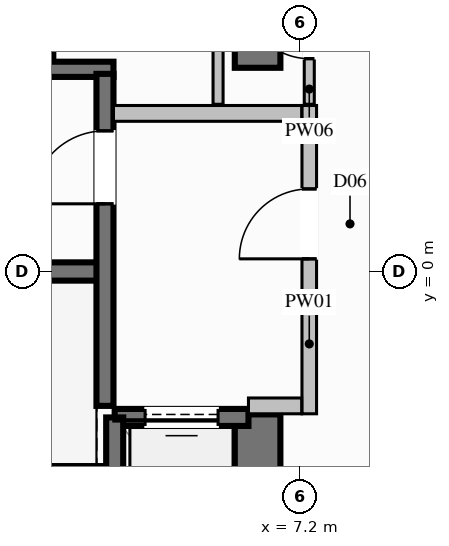
"""IFC4 building model, lengths in metres.
Left out: names, types, materials, properties, quantities, classifications, styles, units other than length and angle.
Written with IfcOpenShell. Run it as: python <this file> out.ifc"""

import sys

from ifc_helpers import new_model, si_unit, direction, frame, frame_2d, origin, place, context, subcontext, project, spatial, rectangle, extrude, element, fill, save


model = new_model("IFC4")
c1 = context("Model", 3, precision=1e-05, world=origin(), true_north=direction((0.0, 1.0)))
c2 = subcontext(c1, "Body", "Model", "MODEL_VIEW")
j1 = project(units=[si_unit("LENGTHUNIT", "METRE"), si_unit("PLANEANGLEUNIT", "RADIAN")], contexts=[c1])
p1 = place(None, origin())
s1 = spatial("IfcSite", under=j1, at=p1, CompositionType="ELEMENT")
p2 = place(p1, origin())
s2 = spatial("IfcBuilding", under=s1, at=p2, CompositionType="ELEMENT")
p3 = place(p2, frame((0.0, 0.0, 35.6)))
s3 = spatial("IfcBuildingStorey", under=s2, at=p3, CompositionType="ELEMENT", Elevation=35.6)
p4 = place(p3, frame((-3.99, 0.0, 0.0), z_axis=(0.0, 0.0, 1.0), x_axis=(1.0, 0.0, 0.0)))
e1 = element("IfcWall", 1, at=p4, inside=s3, PredefinedType="SHEAR", context=c2, shape_type="SweptSolid", body=[
    extrude(rectangle(XDim=7.98, YDim=0.3, at=frame_2d((3.99, 0.0))), origin(), (0.0, 0.0, 1.0), 3.6),
])
for number, where, z_axis, x_axis in (
    (2, (-4.13, -3.325, 0.0), (0.0, 0.0, 1.0), (1.0, 0.0, 0.0)),
    (3, (-4.13, 3.325, 0.0), (0.0, 0.0, 1.0), (1.0, 0.0, 0.0)),
):
    element("IfcWall", number, at=place(p3, frame(where, z_axis=z_axis, x_axis=x_axis)), inside=s3, PredefinedType="SOLIDWALL", context=c2, shape_type="SweptSolid", body=[
        extrude(rectangle(XDim=8.26, YDim=0.25, at=frame_2d((4.13, 0.0))), origin(), (0.0, 0.0, 1.0), 3.6),
    ])
p5 = place(p3, frame((6.5, -6.475, 0.0), z_axis=(0.0, 0.0, 1.0), x_axis=(0.0, 1.0, 0.0)))
e4 = element("IfcWall", 4, at=p5, inside=s3, PredefinedType="SHEAR", context=c2, shape_type="SweptSolid", body=[
    extrude(rectangle(XDim=4.125, YDim=0.75, at=frame_2d((2.062, 0.0))), origin(), (0.0, 0.0, 1.0), 3.6),
])
p6 = place(p3, frame((6.5, 3.35, 0.0), z_axis=(0.0, 0.0, 1.0), x_axis=(0.0, 1.0, 0.0)))
e5 = element("IfcWall", 5, at=p6, inside=s3, PredefinedType="SHEAR", context=c2, shape_type="SweptSolid", body=[
    extrude(rectangle(XDim=3.125, YDim=0.75, at=frame_2d((1.562, 0.0))), origin(), (0.0, 0.0, 1.0), 3.6),
])
p7 = place(p3, frame((3.0, 3.5, 0.0), z_axis=(0.0, 0.0, 1.0), x_axis=(0.0, 1.0, 0.0)))
e6 = element("IfcWall", 6, at=p7, inside=s3, PredefinedType="SOLIDWALL", context=c2, shape_type="SweptSolid", body=[
    extrude(rectangle(XDim=2.5, YDim=0.28, at=frame_2d((1.25, 0.0))), origin(), (0.0, 0.0, 1.0), 3.34),
])
p8 = place(p3, frame((6.35, -2.4, 0.0), z_axis=(0.0, 0.0, 1.0), x_axis=(-1.0, 0.0, 0.0)))
e7 = element("IfcWall", 7, at=p8, inside=s3, PredefinedType="SOLIDWALL", context=c2, shape_type="SweptSolid", body=[
    extrude(rectangle(XDim=2.2, YDim=0.28, at=frame_2d((1.1, 0.0))), origin(), (0.0, 0.0, 1.0), 3.34),
])
p9 = place(p8, frame((0.5, 0.0, 0.0)))
e8 = element("IfcOpeningElement", 8, at=p9, cuts=e7, PredefinedType="OPENING", context=c2, shape_type="SweptSolid", body=[
    extrude(rectangle(XDim=1.2, YDim=2.2, at=frame_2d((0.6, 1.1))), frame((0.0, 0.15, 0.0), z_axis=(0.0, -1.0, 0.0), x_axis=(1.0, 0.0, 0.0)), (0.0, 0.0, 1.0), 0.3),
])
p10 = place(p3, frame((4.15, -2.4, 0.0), z_axis=(0.0, 0.0, 1.0), x_axis=(0.0, -1.0, 0.0)))
e9 = element("IfcWall", 9, at=p10, inside=s3, PredefinedType="SOLIDWALL", context=c2, shape_type="SweptSolid", body=[
    extrude(rectangle(XDim=2.7, YDim=0.28, at=frame_2d((1.35, 0.0))), origin(), (0.0, 0.0, 1.0), 3.34),
])
p11 = place(p3, frame((3.99, -2.21, 0.0), z_axis=(0.0, 0.0, 1.0), x_axis=(0.0, 1.0, 0.0)))
e10 = element("IfcWall", 10, at=p11, inside=s3, PredefinedType="SOLIDWALL", context=c2, shape_type="SweptSolid", body=[
    extrude(rectangle(XDim=5.46, YDim=0.28, at=frame_2d((2.73, 0.0))), origin(), (0.0, 0.0, 1.0), 3.34),
])
p12 = place(p11, frame((3.323, 0.0, 0.0)))
e11 = element("IfcOpeningElement", 11, at=p12, cuts=e10, PredefinedType="OPENING", context=c2, shape_type="SweptSolid", body=[
    extrude(rectangle(XDim=1.2, YDim=2.2, at=frame_2d((0.6, 1.1))), frame((0.0, 0.15, 0.0), z_axis=(0.0, -1.0, 0.0), x_axis=(1.0, 0.0, 0.0)), (0.0, 0.0, 1.0), 0.3),
])
p13 = place(p3, frame((7.35, -2.34, 0.0), z_axis=(0.0, 0.0, 1.0), x_axis=(0.0, 1.0, 0.0)))
e12 = element("IfcWall", 12, at=p13, inside=s3, PredefinedType="PARTITIONING", context=c2, shape_type="SweptSolid", body=[
    extrude(rectangle(XDim=5.07, YDim=0.24, at=frame_2d((2.535, 0.0))), origin(), (0.0, 0.0, 1.0), 2.425),
])
p14 = place(p13, frame((2.548, 0.0, 0.0)))
e13 = element("IfcOpeningElement", 13, at=p14, cuts=e12, PredefinedType="OPENING", context=c2, shape_type="SweptSolid", body=[
    extrude(rectangle(XDim=1.15, YDim=2.2, at=frame_2d((0.575, 1.1))), frame((0.0, 0.13, 0.0), z_axis=(0.0, -1.0, 0.0), x_axis=(1.0, 0.0, 0.0)), (0.0, 0.0, 1.0), 0.26),
])
p15 = place(p3, frame((6.35, -2.21, 0.0), z_axis=(0.0, 0.0, 1.0), x_axis=(1.0, 0.0, 0.0)))
e14 = element("IfcWall", 14, at=p15, inside=s3, PredefinedType="PARTITIONING", context=c2, shape_type="SweptSolid", body=[
    extrude(rectangle(XDim=0.875, YDim=0.26, at=frame_2d((0.438, 0.0))), origin(), (0.0, 0.0, 1.0), 3.34),
])
p16 = place(p3, frame((4.13, 2.6, 0.0), z_axis=(0.0, 0.0, 1.0), x_axis=(1.0, 0.0, 0.0)))
e15 = element("IfcWall", 15, at=p16, inside=s3, PredefinedType="PARTITIONING", context=c2, shape_type="SweptSolid", body=[
    extrude(rectangle(XDim=3.095, YDim=0.26, at=frame_2d((1.548, 0.0))), origin(), (0.0, 0.0, 1.0), 3.34),
])
p17 = place(p3, frame((7.35, 2.75, 0.0), z_axis=(0.0, 0.0, 1.0), x_axis=(0.0, 1.0, 0.0)))
e16 = element("IfcWall", 16, at=p17, inside=s3, PredefinedType="PARTITIONING", context=c2, shape_type="SweptSolid", body=[
    extrude(rectangle(XDim=2.55, YDim=0.165, at=frame_2d((1.275, 0.0))), origin(), (0.0, 0.0, 1.0), 3.34),
])
p18 = place(p17, frame((0.75, 0.0, 0.0)))
e17 = element("IfcOpeningElement", 17, at=p18, cuts=e16, PredefinedType="OPENING", context=c2, shape_type="SweptSolid", body=[
    extrude(rectangle(XDim=1.05, YDim=2.15, at=frame_2d((0.525, 1.075))), frame((0.0, 0.093, 0.0), z_axis=(0.0, -1.0, 0.0), x_axis=(1.0, 0.0, 0.0)), (0.0, 0.0, 1.0), 0.185),
])
p19 = place(p3, frame((5.85, 5.3, 0.0), z_axis=(0.0, 0.0, 1.0), x_axis=(0.0, -1.0, 0.0)))
e18 = element("IfcWall", 18, at=p19, inside=s3, PredefinedType="PARTITIONING", context=c2, shape_type="SweptSolid", body=[
    extrude(rectangle(XDim=2.55, YDim=0.165, at=frame_2d((1.275, 0.0))), origin(), (0.0, 0.0, 1.0), 2.425),
])
p20 = place(p9, origin())
e19 = element("IfcDoor", 19, at=p20, inside=s3, OperationType="SLIDING_TO_LEFT", PredefinedType="DOOR", context=c2, shape_type="SweptSolid", body=[
    extrude(rectangle(XDim=1.2, YDim=2.2, at=frame_2d((0.6, 1.1))), frame((0.0, 0.025, 0.0), z_axis=(0.0, -1.0, 0.0), x_axis=(1.0, 0.0, 0.0)), (0.0, 0.0, 1.0), 0.05),
])
fill(e8, e19)
p21 = place(p12, origin())
e20 = element("IfcDoor", 20, at=p21, inside=s3, OperationType="SINGLE_SWING_LEFT", PredefinedType="DOOR", context=c2, shape_type="SweptSolid", body=[
    extrude(rectangle(XDim=1.2, YDim=2.2, at=frame_2d((0.6, 1.1))), frame((0.0, 0.025, 0.0), z_axis=(0.0, -1.0, 0.0), x_axis=(1.0, 0.0, 0.0)), (0.0, 0.0, 1.0), 0.05),
])
fill(e11, e20)
p22 = place(p14, origin())
e21 = element("IfcDoor", 21, at=p22, inside=s3, OperationType="SINGLE_SWING_LEFT", PredefinedType="DOOR", context=c2, shape_type="SweptSolid", body=[
    extrude(rectangle(XDim=1.15, YDim=2.2, at=frame_2d((0.575, 1.1))), frame((0.0, 0.025, 0.0), z_axis=(0.0, -1.0, 0.0), x_axis=(1.0, 0.0, 0.0)), (0.0, 0.0, 1.0), 0.05),
])
fill(e13, e21)
p23 = place(p18, origin())
e22 = element("IfcDoor", 22, at=p23, inside=s3, OperationType="SINGLE_SWING_RIGHT", PredefinedType="DOOR", context=c2, shape_type="SweptSolid", body=[
    extrude(rectangle(XDim=1.05, YDim=2.15, at=frame_2d((0.525, 1.075))), frame((0.0, 0.025, 0.0), z_axis=(0.0, -1.0, 0.0), x_axis=(1.0, 0.0, 0.0)), (0.0, 0.0, 1.0), 0.05),
])
fill(e17, e22)
save(model, sys.argv[1])
